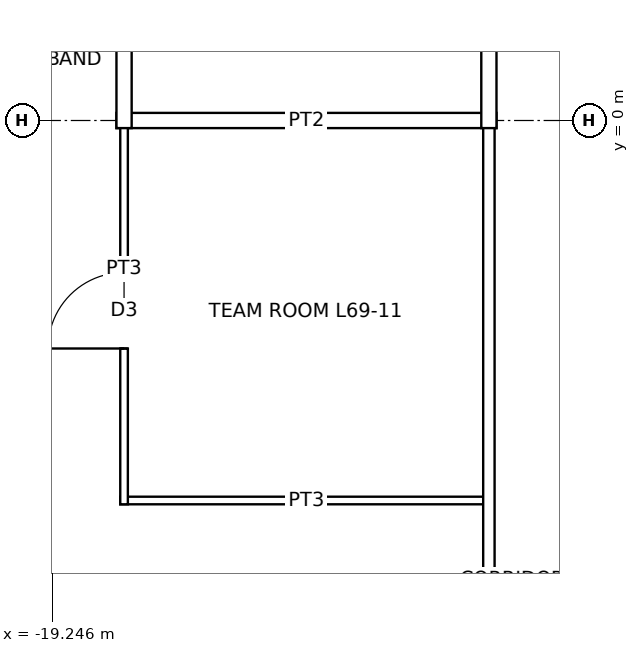
"""IFC4 building model, lengths in metres.
Left out: names, types, materials, properties, quantities, classifications, styles, units other than length and angle.
Written with IfcOpenShell. Run it as: python <this file> out.ifc"""

import sys

from ifc_helpers import new_model, si_unit, direction, frame, frame_2d, origin, place, context, subcontext, project, spatial, rectangle, extrude, element, fill, save


model = new_model("IFC4")
c1 = context("Model", 3, precision=1e-05, world=origin(), true_north=direction((0.0, 1.0)))
c2 = subcontext(c1, "Body", "Model", "MODEL_VIEW")
j1 = project(units=[si_unit("LENGTHUNIT", "METRE"), si_unit("PLANEANGLEUNIT", "RADIAN")], contexts=[c1])
p1 = place(None, origin())
s1 = spatial("IfcSite", under=j1, at=p1, CompositionType="ELEMENT")
p2 = place(p1, origin())
s2 = spatial("IfcBuilding", under=s1, at=p2, CompositionType="ELEMENT")
p3 = place(p2, frame((0.0, 0.0, 311.9)))
s3 = spatial("IfcBuildingStorey", under=s2, at=p3, CompositionType="ELEMENT", Elevation=311.9)
p4 = place(p3, frame((-18.35, -5.0, 0.0), z_axis=(0.0, 0.0, 1.0), x_axis=(1.0, 0.0, 0.0)))
e1 = element("IfcWall", 1, at=p4, inside=s3, PredefinedType="PARTITIONING", context=c2, shape_type="SweptSolid", body=[
    extrude(rectangle(XDim=4.9, YDim=0.1, at=frame_2d((2.45, 0.0))), origin(), (0.0, 0.0, 1.0), 3.85),
])
p5 = place(p3, frame((-18.4, 0.0, 0.0), z_axis=(0.0, 0.0, 1.0), x_axis=(1.0, 0.0, 0.0)))
e2 = element("IfcWall", 2, at=p5, inside=s3, PredefinedType="PARTITIONING", context=c2, shape_type="SweptSolid", body=[
    extrude(rectangle(XDim=5.0, YDim=0.2, at=frame_2d((2.5, 0.0))), origin(), (0.0, 0.0, 1.0), 3.243),
])
p6 = place(p3, frame((-18.3, -5.05, 0.0), z_axis=(0.0, 0.0, 1.0), x_axis=(0.0, 1.0, 0.0)))
e3 = element("IfcWall", 3, at=p6, inside=s3, PredefinedType="PARTITIONING", context=c2, shape_type="SweptSolid", body=[
    extrude(rectangle(XDim=5.1, YDim=0.1, at=frame_2d((2.55, 0.0))), origin(), (0.0, 0.0, 1.0), 3.85),
])
p7 = place(p6, frame((2.05, 0.0, 0.0)))
e4 = element("IfcOpeningElement", 4, at=p7, cuts=e3, PredefinedType="OPENING", context=c2, shape_type="SweptSolid", body=[
    extrude(rectangle(XDim=1.0, YDim=2.1, at=frame_2d((0.5, 1.05))), frame((0.0, 0.06, 0.0), z_axis=(0.0, -1.0, 0.0), x_axis=(1.0, 0.0, 0.0)), (0.0, 0.0, 1.0), 0.12),
])
p8 = place(p3, frame((-18.3, -0.1, 0.0), z_axis=(0.0, 0.0, 1.0), x_axis=(0.0, 1.0, 0.0)))
e5 = element("IfcWall", 5, at=p8, inside=s3, PredefinedType="PARTITIONING", context=c2, shape_type="SweptSolid", body=[
    extrude(rectangle(XDim=5.2, YDim=0.2, at=frame_2d((2.6, 0.0))), origin(), (0.0, 0.0, 1.0), 3.85),
])
p9 = place(p8, frame((2.1, 0.0, 0.0)))
e6 = element("IfcOpeningElement", 6, at=p9, cuts=e5, PredefinedType="OPENING", context=c2, shape_type="SweptSolid", body=[
    extrude(rectangle(XDim=1.0, YDim=2.1, at=frame_2d((0.5, 1.05))), frame((0.0, 0.11, 0.0), z_axis=(0.0, -1.0, 0.0), x_axis=(1.0, 0.0, 0.0)), (0.0, 0.0, 1.0), 0.22),
])
p10 = place(p3, frame((-13.5, -13.575, 0.0), z_axis=(0.0, 0.0, 1.0), x_axis=(0.0, 1.0, 0.0)))
e7 = element("IfcWall", 7, at=p10, inside=s3, PredefinedType="PARTITIONING", context=c2, shape_type="SweptSolid", body=[
    extrude(rectangle(XDim=13.65, YDim=0.15, at=frame_2d((6.825, 0.0))), origin(), (0.0, 0.0, 1.0), 3.85),
])
p11 = place(p3, frame((-13.5, -0.1, 0.0), z_axis=(0.0, 0.0, 1.0), x_axis=(0.0, 1.0, 0.0)))
e8 = element("IfcWall", 8, at=p11, inside=s3, PredefinedType="PARTITIONING", context=c2, shape_type="SweptSolid", body=[
    extrude(rectangle(XDim=5.2, YDim=0.2, at=frame_2d((2.6, 0.0))), origin(), (0.0, 0.0, 1.0), 3.85),
])
p12 = place(p7, origin())
e9 = element("IfcDoor", 9, at=p12, inside=s3, OperationType="SINGLE_SWING_LEFT", PredefinedType="DOOR", context=c2, shape_type="SweptSolid", body=[
    extrude(rectangle(XDim=1.0, YDim=2.1, at=frame_2d((0.5, 1.05))), frame((0.0, 0.025, 0.0), z_axis=(0.0, -1.0, 0.0), x_axis=(1.0, 0.0, 0.0)), (0.0, 0.0, 1.0), 0.05),
])
fill(e4, e9)
save(model, sys.argv[1])
